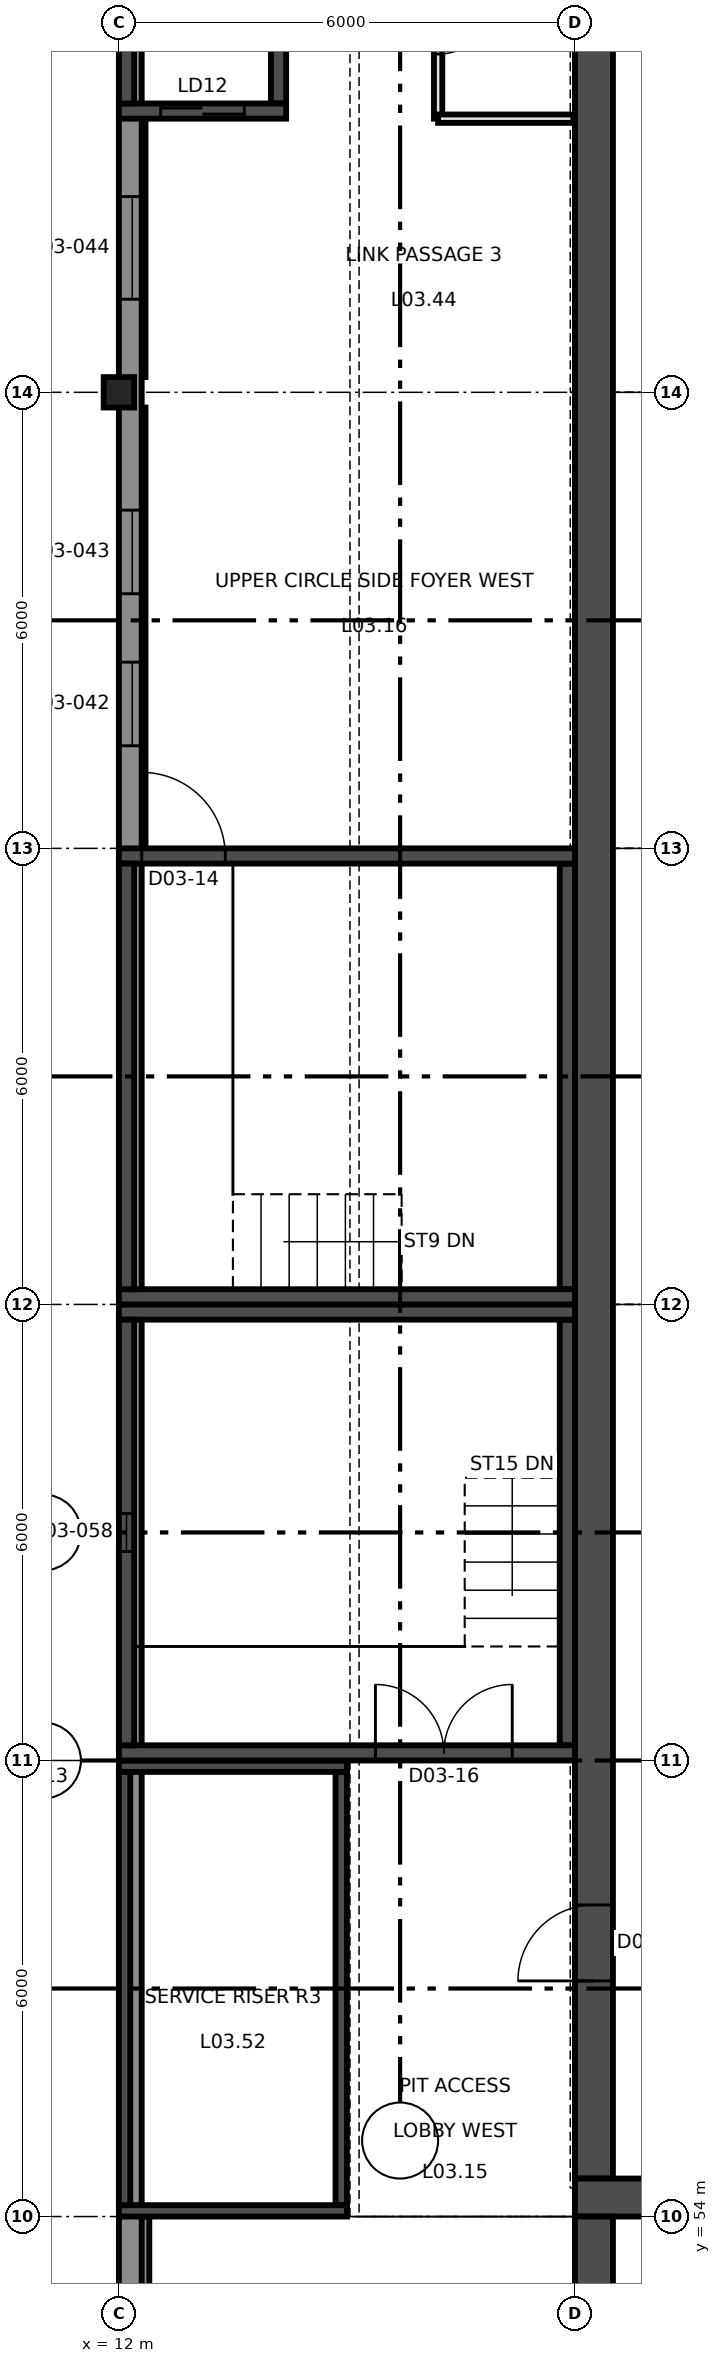
"""IFC4 building model, lengths in metres.
Left out: names, types, materials, properties, quantities, classifications, styles, units other than length and angle.
Written with IfcOpenShell. Run it as: python <this file> out.ifc"""

import sys

from ifc_helpers import new_model, si_unit, direction, frame, frame_2d, origin, origin_2d, place, context, subcontext, project, spatial, rectangle, extrude, element, fill, save


model = new_model("IFC4")
c1 = context("Model", 3, precision=1e-05, world=origin(), true_north=direction((0.0, 1.0)))
c2 = subcontext(c1, "Body", "Model", "MODEL_VIEW")
j1 = project(units=[si_unit("LENGTHUNIT", "METRE"), si_unit("PLANEANGLEUNIT", "RADIAN")], contexts=[c1])
p1 = place(None, origin())
s1 = spatial("IfcSite", under=j1, at=p1, CompositionType="ELEMENT")
p2 = place(p1, origin())
s2 = spatial("IfcBuilding", under=s1, at=p2, CompositionType="ELEMENT")
p3 = place(p2, frame((0.0, 0.0, 16.5)))
s3 = spatial("IfcBuildingStorey", under=s2, at=p3, CompositionType="ELEMENT", Elevation=16.5)
p4 = place(p3, frame((12.0, 78.0, 0.0), z_axis=(0.0, 0.0, 1.0), x_axis=(1.0, 0.0, 0.0)))
e1 = element("IfcColumn", 1, at=p4, inside=s3, PredefinedType="COLUMN", context=c2, shape_type="SweptSolid", body=[
    extrude(rectangle(XDim=0.4, YDim=0.4, at=origin_2d()), origin(), (0.0, 0.0, 1.0), 4.5),
])
p5 = place(p3, frame((12.0, 71.9, 0.0), z_axis=(0.0, 0.0, 1.0), x_axis=(1.0, 0.0, 0.0)))
e2 = element("IfcWall", 2, at=p5, inside=s3, PredefinedType="SHEAR", context=c2, shape_type="SweptSolid", body=[
    extrude(rectangle(XDim=6.0, YDim=0.2, at=frame_2d((3.0, 0.0))), origin(), (0.0, 0.0, 1.0), 4.422),
])
p6 = place(p5, frame((0.3, 0.0, 0.0)))
e3 = element("IfcOpeningElement", 3, at=p6, cuts=e2, PredefinedType="OPENING", context=c2, shape_type="SweptSolid", body=[
    extrude(rectangle(XDim=1.1, YDim=2.2, at=frame_2d((0.55, 1.1))), frame((0.0, 0.11, 0.0), z_axis=(0.0, -1.0, 0.0), x_axis=(1.0, 0.0, 0.0)), (0.0, 0.0, 1.0), 0.22),
])
p7 = place(p3, frame((12.0, 66.1, 0.0), z_axis=(0.0, 0.0, 1.0), x_axis=(1.0, 0.0, 0.0)))
e4 = element("IfcWall", 4, at=p7, inside=s3, PredefinedType="SHEAR", context=c2, shape_type="SweptSolid", body=[
    extrude(rectangle(XDim=6.0, YDim=0.2, at=frame_2d((3.0, 0.0))), origin(), (0.0, 0.0, 1.0), 4.422),
])
p8 = place(p3, frame((12.1, 66.2, 0.0), z_axis=(0.0, 0.0, 1.0), x_axis=(0.0, 1.0, 0.0)))
e5 = element("IfcWall", 5, at=p8, inside=s3, PredefinedType="SHEAR", context=c2, shape_type="SweptSolid", body=[
    extrude(rectangle(XDim=5.6, YDim=0.2, at=frame_2d((2.8, 0.0))), origin(), (0.0, 0.0, 1.0), 4.5),
])
p9 = place(p3, frame((17.9, 66.2, 0.0), z_axis=(0.0, 0.0, 1.0), x_axis=(0.0, 1.0, 0.0)))
e6 = element("IfcWall", 6, at=p9, inside=s3, PredefinedType="SHEAR", context=c2, shape_type="SweptSolid", body=[
    extrude(rectangle(XDim=5.6, YDim=0.2, at=frame_2d((2.8, 0.0))), origin(), (0.0, 0.0, 1.0), 4.422),
])
p10 = place(p3, frame((12.0, 65.9, 0.0), z_axis=(0.0, 0.0, 1.0), x_axis=(1.0, 0.0, 0.0)))
e7 = element("IfcWall", 7, at=p10, inside=s3, PredefinedType="SHEAR", context=c2, shape_type="SweptSolid", body=[
    extrude(rectangle(XDim=6.0, YDim=0.2, at=frame_2d((3.0, 0.0))), origin(), (0.0, 0.0, 1.0), 4.422),
])
p11 = place(p3, frame((12.0, 60.1, 0.0), z_axis=(0.0, 0.0, 1.0), x_axis=(1.0, 0.0, 0.0)))
e8 = element("IfcWall", 8, at=p11, inside=s3, PredefinedType="SHEAR", context=c2, shape_type="SweptSolid", body=[
    extrude(rectangle(XDim=6.0, YDim=0.2, at=frame_2d((3.0, 0.0))), origin(), (0.0, 0.0, 1.0), 4.422),
])
p12 = place(p11, frame((3.375, 0.0, 0.0)))
e9 = element("IfcOpeningElement", 9, at=p12, cuts=e8, PredefinedType="OPENING", context=c2, shape_type="SweptSolid", body=[
    extrude(rectangle(XDim=1.8, YDim=2.2, at=frame_2d((0.9, 1.1))), frame((0.0, 0.11, 0.0), z_axis=(0.0, -1.0, 0.0), x_axis=(1.0, 0.0, 0.0)), (0.0, 0.0, 1.0), 0.22),
])
p13 = place(p3, frame((12.1, 60.2, 0.0), z_axis=(0.0, 0.0, 1.0), x_axis=(0.0, 1.0, 0.0)))
e10 = element("IfcWall", 10, at=p13, inside=s3, PredefinedType="SHEAR", context=c2, shape_type="SweptSolid", body=[
    extrude(rectangle(XDim=5.6, YDim=0.2, at=frame_2d((2.8, 0.0))), origin(), (0.0, 0.0, 1.0), 4.5),
])
p14 = place(p13, frame((2.55, 0.0, 0.9)))
e11 = element("IfcOpeningElement", 11, at=p14, cuts=e10, PredefinedType="OPENING", context=c2, shape_type="SweptSolid", body=[
    extrude(rectangle(XDim=0.5, YDim=2.1, at=frame_2d((0.25, 1.05))), frame((0.0, 0.11, 0.0), z_axis=(0.0, -1.0, 0.0), x_axis=(1.0, 0.0, 0.0)), (0.0, 0.0, 1.0), 0.22),
])
p15 = place(p3, frame((17.9, 60.2, 0.0), z_axis=(0.0, 0.0, 1.0), x_axis=(0.0, 1.0, 0.0)))
e12 = element("IfcWall", 12, at=p15, inside=s3, PredefinedType="SHEAR", context=c2, shape_type="SweptSolid", body=[
    extrude(rectangle(XDim=5.6, YDim=0.2, at=frame_2d((2.8, 0.0))), origin(), (0.0, 0.0, 1.0), 4.422),
])
p16 = place(p3, frame((12.0, 81.7, 0.0), z_axis=(0.0, 0.0, 1.0), x_axis=(1.0, 0.0, 0.0)))
e13 = element("IfcWall", 13, at=p16, inside=s3, PredefinedType="SHEAR", context=c2, shape_type="SweptSolid", body=[
    extrude(rectangle(XDim=2.2, YDim=0.2, at=frame_2d((1.1, 0.0))), origin(), (0.0, 0.0, 1.0), 4.5),
])
p17 = place(p16, frame((0.55, 0.0, 0.0)))
e14 = element("IfcOpeningElement", 14, at=p17, cuts=e13, PredefinedType="OPENING", context=c2, shape_type="SweptSolid", body=[
    extrude(rectangle(XDim=1.1, YDim=2.1, at=frame_2d((0.55, 1.05))), frame((0.0, 0.11, 0.0), z_axis=(0.0, -1.0, 0.0), x_axis=(1.0, 0.0, 0.0)), (0.0, 0.0, 1.0), 0.22),
])
for number, where, z_axis, x_axis in (
    (15, (12.1, 81.8, 0.0), (0.0, 0.0, 1.0), (0.0, 1.0, 0.0)),
    (16, (14.1, 81.8, 0.0), (0.0, 0.0, 1.0), (0.0, 1.0, 0.0)),
):
    element("IfcWall", number, at=place(p3, frame(where, z_axis=z_axis, x_axis=x_axis)), inside=s3, PredefinedType="SHEAR", context=c2, shape_type="SweptSolid", body=[
        extrude(rectangle(XDim=2.0, YDim=0.2, at=frame_2d((1.0, 0.0))), origin(), (0.0, 0.0, 1.0), 4.5),
    ])
for number, where, z_axis, x_axis in (
    (17, (12.0, 59.925, 0.0), (0.0, 0.0, 1.0), (1.0, 0.0, 0.0)),
    (18, (12.0, 54.075, 0.0), (0.0, 0.0, 1.0), (1.0, 0.0, 0.0)),
):
    element("IfcWall", number, at=place(p3, frame(where, z_axis=z_axis, x_axis=x_axis)), inside=s3, PredefinedType="SHEAR", context=c2, shape_type="SweptSolid", body=[
        extrude(rectangle(XDim=3.0, YDim=0.15, at=frame_2d((1.5, 0.0))), origin(), (0.0, 0.0, 1.0), 4.5),
    ])
for number, where, z_axis, x_axis in (
    (19, (12.075, 54.15, 0.0), (0.0, 0.0, 1.0), (0.0, 1.0, 0.0)),
    (20, (14.925, 54.15, 0.0), (0.0, 0.0, 1.0), (0.0, 1.0, 0.0)),
):
    element("IfcWall", number, at=place(p3, frame(where, z_axis=z_axis, x_axis=x_axis)), inside=s3, PredefinedType="SHEAR", context=c2, shape_type="SweptSolid", body=[
        extrude(rectangle(XDim=5.7, YDim=0.15, at=frame_2d((2.85, 0.0))), origin(), (0.0, 0.0, 1.0), 4.5),
    ])
p18 = place(p3, frame((18.25, 54.5, 0.0), z_axis=(0.0, 0.0, 1.0), x_axis=(0.0, 1.0, 0.0)))
e21 = element("IfcWall", 21, at=p18, inside=s3, PredefinedType="SHEAR", context=c2, shape_type="SweptSolid", body=[
    extrude(rectangle(XDim=35.5, YDim=0.5, at=frame_2d((17.75, 0.0))), origin(), (0.0, 0.0, 1.0), 3.9),
])
p19 = place(p18, frame((29.35, 0.0, 0.0)))
e22 = element("IfcOpeningElement", 22, at=p19, cuts=e21, PredefinedType="OPENING", context=c2, shape_type="SweptSolid", body=[
    extrude(rectangle(XDim=1.3, YDim=2.1, at=frame_2d((0.65, 1.05))), frame((0.0, 0.26, 0.0), z_axis=(0.0, -1.0, 0.0), x_axis=(1.0, 0.0, 0.0)), (0.0, 0.0, 1.0), 0.52),
])
p20 = place(p18, frame((2.6, 0.0, 0.0)))
e23 = element("IfcOpeningElement", 23, at=p20, cuts=e21, PredefinedType="OPENING", context=c2, shape_type="SweptSolid", body=[
    extrude(rectangle(XDim=1.0, YDim=2.1, at=frame_2d((0.5, 1.05))), frame((0.0, 0.26, 0.0), z_axis=(0.0, -1.0, 0.0), x_axis=(1.0, 0.0, 0.0)), (0.0, 0.0, 1.0), 0.52),
])
p21 = place(p3, frame((18.25, 30.0, 0.0), z_axis=(0.0, 0.0, 1.0), x_axis=(0.0, 1.0, 0.0)))
e24 = element("IfcWall", 24, at=p21, inside=s3, PredefinedType="SHEAR", context=c2, shape_type="SweptSolid", body=[
    extrude(rectangle(XDim=24.0, YDim=0.5, at=frame_2d((12.0, 0.0))), origin(), (0.0, 0.0, 1.0), 6.5),
])
p22 = place(p3, frame((18.0, 54.25, 0.0), z_axis=(0.0, 0.0, 1.0), x_axis=(1.0, 0.0, 0.0)))
e25 = element("IfcWall", 25, at=p22, inside=s3, PredefinedType="SHEAR", context=c2, shape_type="SweptSolid", body=[
    extrude(rectangle(XDim=30.0, YDim=0.5, at=frame_2d((15.0, 0.0))), origin(), (0.0, 0.0, 1.0), 6.5),
])
p23 = place(p3, frame((12.225, 48.2, 0.0), z_axis=(0.0, 0.0, 1.0), x_axis=(0.0, 1.0, 0.0)))
e26 = element("IfcWall", 26, at=p23, inside=s3, PredefinedType="SOLIDWALL", context=c2, shape_type="SweptSolid", body=[
    extrude(rectangle(XDim=5.8, YDim=0.35, at=frame_2d((2.9, 0.0))), origin(), (0.0, 0.0, 1.0), 3.9),
])
p24 = place(p3, frame((12.175, 72.0, 0.0), z_axis=(0.0, 0.0, 1.0), x_axis=(0.0, 1.0, 0.0)))
e27 = element("IfcWall", 27, at=p24, inside=s3, PredefinedType="SOLIDWALL", context=c2, shape_type="SweptSolid", body=[
    extrude(rectangle(XDim=5.8, YDim=0.35, at=frame_2d((2.9, 0.0))), origin(), (0.0, 0.0, 1.0), 3.9),
])
p25 = place(p24, frame((1.35, 0.0, 2.4)))
e28 = element("IfcOpeningElement", 28, at=p25, cuts=e27, PredefinedType="OPENING", context=c2, shape_type="SweptSolid", body=[
    extrude(rectangle(XDim=1.1, YDim=1.1, at=frame_2d((0.55, 0.55))), frame((0.0, 0.185, 0.0), z_axis=(0.0, -1.0, 0.0), x_axis=(1.0, 0.0, 0.0)), (0.0, 0.0, 1.0), 0.37),
])
p26 = place(p24, frame((3.35, 0.0, 2.4)))
e29 = element("IfcOpeningElement", 29, at=p26, cuts=e27, PredefinedType="OPENING", context=c2, shape_type="SweptSolid", body=[
    extrude(rectangle(XDim=1.1, YDim=1.1, at=frame_2d((0.55, 0.55))), frame((0.0, 0.185, 0.0), z_axis=(0.0, -1.0, 0.0), x_axis=(1.0, 0.0, 0.0)), (0.0, 0.0, 1.0), 0.37),
])
p27 = place(p3, frame((12.175, 78.2, 0.0), z_axis=(0.0, 0.0, 1.0), x_axis=(0.0, 1.0, 0.0)))
e30 = element("IfcWall", 30, at=p27, inside=s3, PredefinedType="SOLIDWALL", context=c2, shape_type="SweptSolid", body=[
    extrude(rectangle(XDim=3.4, YDim=0.35, at=frame_2d((1.7, 0.0))), origin(), (0.0, 0.0, 1.0), 3.9),
])
p28 = place(p27, frame((1.025, 0.0, 1.0)))
e31 = element("IfcOpeningElement", 31, at=p28, cuts=e30, PredefinedType="OPENING", context=c2, shape_type="SweptSolid", body=[
    extrude(rectangle(XDim=1.35, YDim=2.7, at=frame_2d((0.675, 1.35))), frame((0.0, 0.185, 0.0), z_axis=(0.0, -1.0, 0.0), x_axis=(1.0, 0.0, 0.0)), (0.0, 0.0, 1.0), 0.37),
])
p29 = place(p3, frame((12.15, 30.0, 4.5), z_axis=(0.0, 0.0, 1.0), x_axis=(0.0, 1.0, 0.0)))
e32 = element("IfcWall", 32, at=p29, inside=s3, PredefinedType="PARAPET", context=c2, shape_type="SweptSolid", body=[
    extrude(rectangle(XDim=60.0, YDim=0.3, at=frame_2d((30.0, 0.0))), origin(), (0.0, 0.0, 1.0), 1.2),
])
p30 = place(p3, frame((16.2, 81.6, 0.0), z_axis=(0.0, 0.0, 1.0), x_axis=(0.0, 1.0, 0.0)))
e33 = element("IfcWall", 33, at=p30, inside=s3, PredefinedType="PARTITIONING", context=c2, shape_type="SweptSolid", body=[
    extrude(rectangle(XDim=2.4, YDim=0.11, at=frame_2d((1.2, 0.0))), origin(), (0.0, 0.0, 1.0), 4.28),
])
p31 = place(p30, frame((0.85, 0.0, 0.0)))
e34 = element("IfcOpeningElement", 34, at=p31, cuts=e33, PredefinedType="OPENING", context=c2, shape_type="SweptSolid", body=[
    extrude(rectangle(XDim=0.75, YDim=2.04, at=frame_2d((0.375, 1.02))), frame((0.0, 0.065, 0.0), z_axis=(0.0, -1.0, 0.0), x_axis=(1.0, 0.0, 0.0)), (0.0, 0.0, 1.0), 0.13),
])
p32 = place(p3, frame((16.2, 81.6, 0.0), z_axis=(0.0, 0.0, 1.0), x_axis=(1.0, 0.0, 0.0)))
e35 = element("IfcWall", 35, at=p32, inside=s3, PredefinedType="PARTITIONING", context=c2, shape_type="SweptSolid", body=[
    extrude(rectangle(XDim=1.78, YDim=0.11, at=frame_2d((0.89, 0.0))), origin(), (0.0, 0.0, 1.0), 3.9),
])
p33 = place(p25, origin())
e36 = element("IfcWindow", 36, at=p33, inside=s3, PartitioningType="SINGLE_PANEL", PredefinedType="WINDOW", context=c2, shape_type="SweptSolid", body=[
    extrude(rectangle(XDim=1.1, YDim=1.1, at=frame_2d((0.55, 0.55))), frame((0.0, 0.03, 0.0), z_axis=(0.0, -1.0, 0.0), x_axis=(1.0, 0.0, 0.0)), (0.0, 0.0, 1.0), 0.06),
])
fill(e28, e36)
p34 = place(p26, origin())
e37 = element("IfcWindow", 37, at=p34, inside=s3, PartitioningType="SINGLE_PANEL", PredefinedType="WINDOW", context=c2, shape_type="SweptSolid", body=[
    extrude(rectangle(XDim=1.1, YDim=1.1, at=frame_2d((0.55, 0.55))), frame((0.0, 0.03, 0.0), z_axis=(0.0, -1.0, 0.0), x_axis=(1.0, 0.0, 0.0)), (0.0, 0.0, 1.0), 0.06),
])
fill(e29, e37)
p35 = place(p28, origin())
e38 = element("IfcWindow", 38, at=p35, inside=s3, PartitioningType="SINGLE_PANEL", PredefinedType="WINDOW", context=c2, shape_type="SweptSolid", body=[
    extrude(rectangle(XDim=1.35, YDim=2.7, at=frame_2d((0.675, 1.35))), frame((0.0, 0.03, 0.0), z_axis=(0.0, -1.0, 0.0), x_axis=(1.0, 0.0, 0.0)), (0.0, 0.0, 1.0), 0.06),
])
fill(e31, e38)
p36 = place(p14, origin())
e39 = element("IfcWindow", 39, at=p36, inside=s3, PartitioningType="SINGLE_PANEL", PredefinedType="WINDOW", context=c2, shape_type="SweptSolid", body=[
    extrude(rectangle(XDim=0.5, YDim=2.1, at=frame_2d((0.25, 1.05))), frame((0.0, 0.03, 0.0), z_axis=(0.0, -1.0, 0.0), x_axis=(1.0, 0.0, 0.0)), (0.0, 0.0, 1.0), 0.06),
])
fill(e11, e39)
p37 = place(p6, frame((1.1, 0.0, 0.0), z_axis=(0.0, 0.0, 1.0), x_axis=(-1.0, 0.0, 0.0)))
e40 = element("IfcDoor", 40, at=p37, inside=s3, OperationType="SINGLE_SWING_LEFT", PredefinedType="DOOR", context=c2, shape_type="SweptSolid", body=[
    extrude(rectangle(XDim=1.1, YDim=2.2, at=frame_2d((0.55, 1.1))), frame((0.0, 0.025, 0.0), z_axis=(0.0, -1.0, 0.0), x_axis=(1.0, 0.0, 0.0)), (0.0, 0.0, 1.0), 0.05),
])
fill(e3, e40)
p38 = place(p12, origin())
e41 = element("IfcDoor", 41, at=p38, inside=s3, OperationType="DOUBLE_DOOR_SINGLE_SWING", PredefinedType="DOOR", context=c2, shape_type="SweptSolid", body=[
    extrude(rectangle(XDim=1.8, YDim=2.2, at=frame_2d((0.9, 1.1))), frame((0.0, 0.025, 0.0), z_axis=(0.0, -1.0, 0.0), x_axis=(1.0, 0.0, 0.0)), (0.0, 0.0, 1.0), 0.05),
])
fill(e9, e41)
p39 = place(p31, frame((0.75, 0.0, 0.0), z_axis=(0.0, 0.0, 1.0), x_axis=(-1.0, 0.0, 0.0)))
e42 = element("IfcDoor", 42, at=p39, inside=s3, OperationType="SINGLE_SWING_RIGHT", PredefinedType="DOOR", context=c2, shape_type="SweptSolid", body=[
    extrude(rectangle(XDim=0.75, YDim=2.04, at=frame_2d((0.375, 1.02))), frame((0.0, 0.025, 0.0), z_axis=(0.0, -1.0, 0.0), x_axis=(1.0, 0.0, 0.0)), (0.0, 0.0, 1.0), 0.05),
])
fill(e34, e42)
p40 = place(p20, origin())
e43 = element("IfcDoor", 43, at=p40, inside=s3, OperationType="SINGLE_SWING_LEFT", PredefinedType="DOOR", context=c2, shape_type="SweptSolid", body=[
    extrude(rectangle(XDim=1.0, YDim=2.1, at=frame_2d((0.5, 1.05))), frame((0.0, 0.025, 0.0), z_axis=(0.0, -1.0, 0.0), x_axis=(1.0, 0.0, 0.0)), (0.0, 0.0, 1.0), 0.05),
])
fill(e23, e43)
p41 = place(p17, origin())
e44 = element("IfcDoor", 44, at=p41, inside=s3, OperationType="DOUBLE_DOOR_SLIDING", PredefinedType="DOOR", context=c2, shape_type="SweptSolid", body=[
    extrude(rectangle(XDim=1.1, YDim=2.1, at=frame_2d((0.55, 1.05))), frame((0.0, 0.025, 0.0), z_axis=(0.0, -1.0, 0.0), x_axis=(1.0, 0.0, 0.0)), (0.0, 0.0, 1.0), 0.05),
])
fill(e14, e44)
save(model, sys.argv[1])
